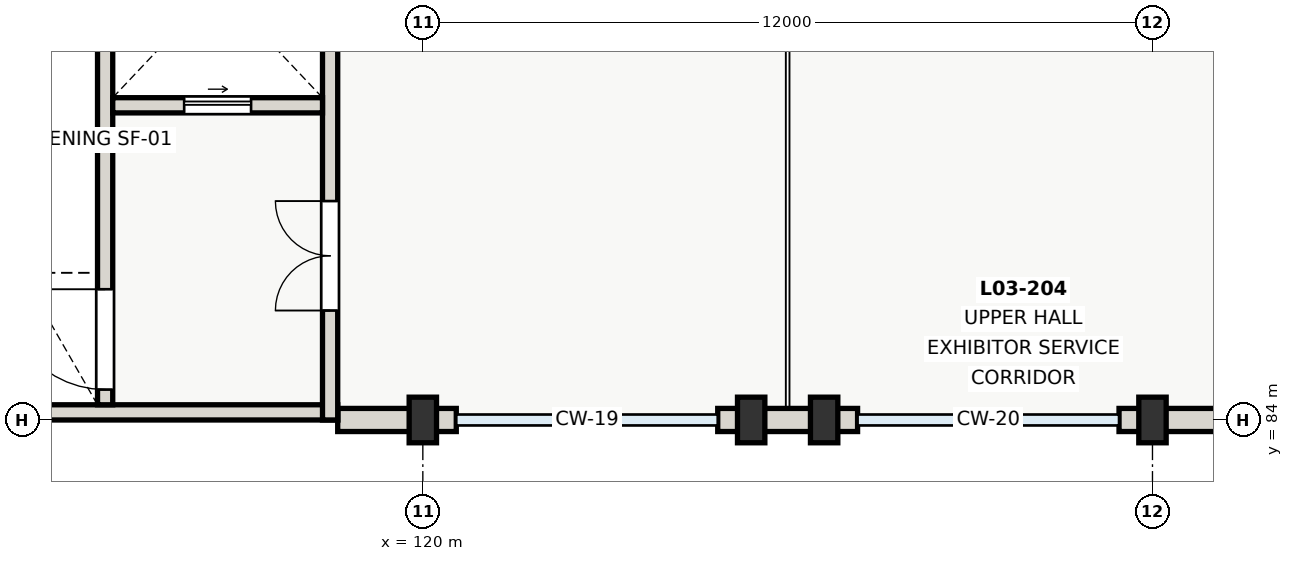
"""IFC4 building model, lengths in metres.
Left out: names, types, materials, properties, quantities, classifications, styles, units other than length and angle.
Written with IfcOpenShell. Run it as: python <this file> out.ifc"""

import sys

from ifc_helpers import new_model, si_unit, direction, frame, frame_2d, origin, origin_2d, place, context, subcontext, project, spatial, rectangle, extrude, element, fill, save


model = new_model("IFC4")
c1 = context("Model", 3, precision=1e-05, world=origin(), true_north=direction((0.0, 1.0)))
c2 = subcontext(c1, "Body", "Model", "MODEL_VIEW")
j1 = project(units=[si_unit("LENGTHUNIT", "METRE"), si_unit("PLANEANGLEUNIT", "RADIAN")], contexts=[c1])
p1 = place(None, origin())
s1 = spatial("IfcSite", under=j1, at=p1, CompositionType="ELEMENT")
p2 = place(p1, origin())
s2 = spatial("IfcBuilding", under=s1, at=p2, CompositionType="ELEMENT")
p3 = place(p2, frame((0.0, 0.0, 8.4)))
s3 = spatial("IfcBuildingStorey", under=s2, at=p3, CompositionType="ELEMENT", Elevation=8.4)
for number, where, z_axis, x_axis in (
    (1, (120.0, 84.0, 0.0), (0.0, 0.0, 1.0), (1.0, 0.0, 0.0)),
    (2, (125.4, 84.0, 0.0), (0.0, 0.0, 1.0), (1.0, 0.0, 0.0)),
    (3, (126.6, 84.0, 0.0), (0.0, 0.0, 1.0), (1.0, 0.0, 0.0)),
    (4, (132.0, 84.0, 0.0), (0.0, 0.0, 1.0), (1.0, 0.0, 0.0)),
):
    element("IfcColumn", number, at=place(p3, frame(where, z_axis=z_axis, x_axis=x_axis)), inside=s3, PredefinedType="PILASTER", context=c2, shape_type="SweptSolid", body=[
        extrude(rectangle(XDim=0.45, YDim=0.75, at=origin_2d()), origin(), (0.0, 0.0, 1.0), 4.2),
    ])
p4 = place(p3, frame((120.0, 84.0, 0.0), z_axis=(0.0, 0.0, 1.0), x_axis=(-1.0, 0.0, 0.0)))
e5 = element("IfcWall", 5, at=p4, inside=s3, PredefinedType="SOLIDWALL", context=c2, shape_type="SweptSolid", body=[
    extrude(rectangle(XDim=1.4, YDim=0.38, at=frame_2d((0.7, 0.0))), origin(), (0.0, 0.0, 1.0), 3.57),
])
p5 = place(p3, frame((120.55, 84.0, 0.0), z_axis=(0.0, 0.0, 1.0), x_axis=(-1.0, 0.0, 0.0)))
e6 = element("IfcWall", 6, at=p5, inside=s3, PredefinedType="SOLIDWALL", context=c2, shape_type="SweptSolid", body=[
    extrude(rectangle(XDim=0.548, YDim=0.38, at=frame_2d((0.274, 0.0))), origin(), (0.0, 0.0, 1.0), 3.45),
])
for number, where, z_axis, x_axis in (
    (7, (125.398, 84.0, 0.0), (0.0, 0.0, 1.0), (-1.0, 0.0, 0.0)),
    (8, (127.15, 84.0, 0.0), (0.0, 0.0, 1.0), (-1.0, 0.0, 0.0)),
):
    element("IfcWall", number, at=place(p3, frame(where, z_axis=z_axis, x_axis=x_axis)), inside=s3, PredefinedType="SOLIDWALL", context=c2, shape_type="SweptSolid", body=[
        extrude(rectangle(XDim=0.548, YDim=0.38, at=frame_2d((0.274, 0.0))), origin(), (0.0, 0.0, 1.0), 3.45),
    ])
p6 = place(p3, frame((131.998, 84.0, 0.0), z_axis=(0.0, 0.0, 1.0), x_axis=(-1.0, 0.0, 0.0)))
e9 = element("IfcWall", 9, at=p6, inside=s3, PredefinedType="SOLIDWALL", context=c2, shape_type="SweptSolid", body=[
    extrude(rectangle(XDim=0.548, YDim=0.38, at=frame_2d((0.274, 0.0))), origin(), (0.0, 0.0, 1.0), 3.45),
])
p7 = place(p3, frame((133.4, 84.0, 0.0), z_axis=(0.0, 0.0, 1.0), x_axis=(-1.0, 0.0, 0.0)))
e10 = element("IfcWall", 10, at=p7, inside=s3, PredefinedType="SOLIDWALL", context=c2, shape_type="SweptSolid", body=[
    extrude(rectangle(XDim=1.4, YDim=0.38, at=frame_2d((0.7, 0.0))), origin(), (0.0, 0.0, 1.0), 3.69),
])
p8 = place(p3, frame((126.6, 84.0, 0.0), z_axis=(0.0, 0.0, 1.0), x_axis=(-1.0, 0.0, 0.0)))
e11 = element("IfcWall", 11, at=p8, inside=s3, PredefinedType="SOLIDWALL", context=c2, shape_type="SweptSolid", body=[
    extrude(rectangle(XDim=1.2, YDim=0.38, at=frame_2d((0.6, 0.0))), origin(), (0.0, 0.0, 1.0), 4.2),
])
p9 = place(p3, frame((118.6, 84.125, 0.0), z_axis=(0.0, 0.0, 1.0), x_axis=(-1.0, 0.0, 0.0)))
e12 = element("IfcWall", 12, at=p9, inside=s3, PredefinedType="SHEAR", context=c2, shape_type="SweptSolid", body=[
    extrude(rectangle(XDim=9.2, YDim=0.25, at=frame_2d((4.6, 0.0))), origin(), (0.0, 0.0, 1.0), 5.6),
])
p10 = place(p3, frame((118.475, 84.0, 0.0), z_axis=(0.0, 0.0, 1.0), x_axis=(0.0, 1.0, 0.0)))
e13 = element("IfcWall", 13, at=p10, inside=s3, PredefinedType="SHEAR", context=c2, shape_type="SweptSolid", body=[
    extrude(rectangle(XDim=9.2, YDim=0.25, at=frame_2d((4.6, 0.0))), origin(), (0.0, 0.0, 1.0), 5.6),
])
p11 = place(p10, frame((1.8, 0.0, 0.0)))
e14 = element("IfcOpeningElement", 14, at=p11, cuts=e13, PredefinedType="OPENING", context=c2, shape_type="SweptSolid", body=[
    extrude(rectangle(XDim=1.8, YDim=2.15, at=frame_2d((0.9, 1.075))), frame((0.0, 0.135, 0.0), z_axis=(0.0, -1.0, 0.0), x_axis=(1.0, 0.0, 0.0)), (0.0, 0.0, 1.0), 0.27),
])
p12 = place(p3, frame((114.775, 84.25, 0.0), z_axis=(0.0, 0.0, 1.0), x_axis=(0.0, 1.0, 0.0)))
e15 = element("IfcWall", 15, at=p12, inside=s3, PredefinedType="SHEAR", context=c2, shape_type="SweptSolid", body=[
    extrude(rectangle(XDim=8.7, YDim=0.25, at=frame_2d((4.35, 0.0))), origin(), (0.0, 0.0, 1.0), 5.6),
])
p13 = place(p12, frame((0.25, 0.0, 0.0)))
e16 = element("IfcOpeningElement", 16, at=p13, cuts=e15, PredefinedType="OPENING", context=c2, shape_type="SweptSolid", body=[
    extrude(rectangle(XDim=1.65, YDim=2.1, at=frame_2d((0.825, 1.05))), frame((0.0, 0.135, 0.0), z_axis=(0.0, -1.0, 0.0), x_axis=(1.0, 0.0, 0.0)), (0.0, 0.0, 1.0), 0.27),
])
p14 = place(p3, frame((114.9, 89.175, 0.0), z_axis=(0.0, 0.0, 1.0), x_axis=(1.0, 0.0, 0.0)))
e17 = element("IfcWall", 17, at=p14, inside=s3, PredefinedType="SHEAR", context=c2, shape_type="SweptSolid", body=[
    extrude(rectangle(XDim=3.45, YDim=0.25, at=frame_2d((1.725, 0.0))), origin(), (0.0, 0.0, 1.0), 5.6),
])
p15 = place(p14, frame((1.175, 0.0, 0.0)))
e18 = element("IfcOpeningElement", 18, at=p15, cuts=e17, PredefinedType="OPENING", context=c2, shape_type="SweptSolid", body=[
    extrude(rectangle(XDim=1.1, YDim=2.1, at=frame_2d((0.55, 1.05))), frame((0.0, 0.135, 0.0), z_axis=(0.0, -1.0, 0.0), x_axis=(1.0, 0.0, 0.0)), (0.0, 0.0, 1.0), 0.27),
])
p16 = place(p11, origin())
e19 = element("IfcDoor", 19, at=p16, inside=s3, OperationType="DOUBLE_DOOR_SINGLE_SWING", PredefinedType="DOOR", context=c2, shape_type="SweptSolid", body=[
    extrude(rectangle(XDim=1.8, YDim=2.15, at=frame_2d((0.9, 1.075))), frame((0.0, 0.025, 0.0), z_axis=(0.0, -1.0, 0.0), x_axis=(1.0, 0.0, 0.0)), (0.0, 0.0, 1.0), 0.05),
])
fill(e14, e19)
p17 = place(p13, origin())
e20 = element("IfcDoor", 20, at=p17, inside=s3, OperationType="SINGLE_SWING_RIGHT", PredefinedType="DOOR", context=c2, shape_type="SweptSolid", body=[
    extrude(rectangle(XDim=1.65, YDim=2.1, at=frame_2d((0.825, 1.05))), frame((0.0, 0.025, 0.0), z_axis=(0.0, -1.0, 0.0), x_axis=(1.0, 0.0, 0.0)), (0.0, 0.0, 1.0), 0.05),
])
fill(e16, e20)
p18 = place(p15, origin())
e21 = element("IfcDoor", 21, at=p18, inside=s3, OperationType="SLIDING_TO_RIGHT", PredefinedType="DOOR", context=c2, shape_type="SweptSolid", body=[
    extrude(rectangle(XDim=1.1, YDim=2.1, at=frame_2d((0.55, 1.05))), frame((0.0, 0.025, 0.0), z_axis=(0.0, -1.0, 0.0), x_axis=(1.0, 0.0, 0.0)), (0.0, 0.0, 1.0), 0.05),
])
fill(e18, e21)
save(model, sys.argv[1])
